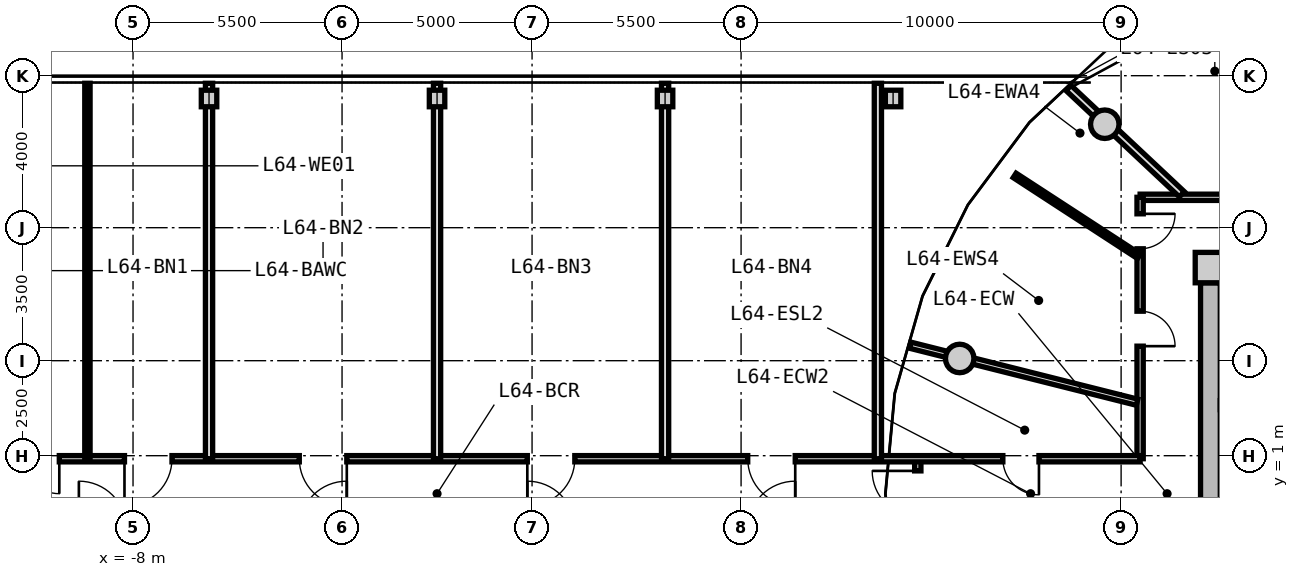
"""IFC4 building model, lengths in metres.
Left out: names, types, materials, properties, quantities, classifications, styles, units other than length and angle.
Written with IfcOpenShell. Run it as: python <this file> out.ifc"""

import sys

from ifc_helpers import new_model, si_unit, direction, frame, frame_2d, origin, origin_2d, place, context, subcontext, project, spatial, rectangle, circle, i_section, extrude, source, transform, mapped, element, fill, save


model = new_model("IFC4")
c1 = context("Model", 3, precision=1e-05, world=origin(), true_north=direction((0.0, 1.0)))
c2 = subcontext(c1, "Body", "Model", "MODEL_VIEW")
j1 = project(units=[si_unit("LENGTHUNIT", "METRE"), si_unit("PLANEANGLEUNIT", "RADIAN")], contexts=[c1])
p1 = place(None, origin())
s1 = spatial("IfcSite", under=j1, at=p1, CompositionType="ELEMENT")
p2 = place(p1, origin())
s2 = spatial("IfcBuilding", under=s1, at=p2, CompositionType="ELEMENT")
p3 = place(p2, frame((0.0, 0.0, 207.8)))
s3 = spatial("IfcBuildingStorey", under=s2, at=p3, CompositionType="ELEMENT", Elevation=207.8)
m1 = source(origin(), c2, "Body", "SweptSolid", [
    extrude(rectangle(XDim=0.8, YDim=0.8, at=origin_2d()), origin(), (0.0, 0.0, 1.0), 3.05),
])
p4 = place(p3, frame((20.35, 5.95, 0.0), z_axis=(0.0, 0.0, 1.0), x_axis=(1.0, 0.0, 0.0)))
e1 = element("IfcColumn", 1, at=p4, inside=s3, PredefinedType="COLUMN", context=c2, shape_type="MappedRepresentation", body=[
    mapped(m1, transform((0.0, 0.0, 0.0), x_axis=(1.0, 0.0, 0.0), y_axis=(0.0, 1.0, 0.0), z_axis=(0.0, 0.0, 1.0), scale=1.0)),
])
m2 = source(origin(), c2, "Body", "SweptSolid", [
    extrude(rectangle(XDim=11.1, YDim=0.52, at=frame_2d((5.55, 0.0))), origin(), (0.0, 0.0, 1.0), 2.76),
])
p5 = place(p3, frame((20.35, -5.55, 0.0), z_axis=(0.0, 0.0, 1.0), x_axis=(0.0, 1.0, 0.0)))
e2 = element("IfcWall", 2, at=p5, inside=s3, PredefinedType="SHEAR", context=c2, shape_type="MappedRepresentation", body=[
    mapped(m2, transform((0.0, 0.0, 0.0), x_axis=(1.0, 0.0, 0.0), y_axis=(0.0, 1.0, 0.0), z_axis=(0.0, 0.0, 1.0), scale=1.0)),
])
p6 = place(p5, frame((3.8, 0.0, 0.0)))
e3 = element("IfcOpeningElement", 3, at=p6, cuts=e2, PredefinedType="OPENING", context=c2, shape_type="SweptSolid", body=[
    extrude(rectangle(XDim=1.2, YDim=2.15, at=frame_2d((0.6, 1.075))), frame((0.0, 0.27, 0.0), z_axis=(0.0, -1.0, 0.0), x_axis=(1.0, 0.0, 0.0)), (0.0, 0.0, 1.0), 0.54),
])
m3 = source(origin(), c2, "Body", "SweptSolid", [
    extrude(circle(Radius=0.375, at=origin_2d()), origin(), (0.0, 0.0, 1.0), 3.05),
])
for number, where, z_axis, x_axis in (
    (4, (17.57, 9.723, 0.0), (0.0, 0.0, 1.0), (1.0, 0.0, 0.0)),
    (5, (13.753, 3.559, 0.0), (0.0, 0.0, 1.0), (1.0, 0.0, 0.0)),
):
    element("IfcColumn", number, at=place(p3, frame(where, z_axis=z_axis, x_axis=x_axis)), inside=s3, PredefinedType="COLUMN", context=c2, shape_type="MappedRepresentation", body=[
        mapped(m3, transform((0.0, 0.0, 0.0), x_axis=(1.0, 0.0, 0.0), y_axis=(0.0, 1.0, 0.0), z_axis=(0.0, 0.0, 1.0), scale=1.0)),
    ])
m4 = source(origin(), c2, "Body", "SweptSolid", [
    extrude(i_section(OverallWidth=0.407, OverallDepth=0.435, WebThickness=0.024, FlangeThickness=0.039, FilletRadius=0.015, at=origin_2d()), origin(), (0.0, 0.0, 1.0), 3.05),
])
for number, where, z_axis, x_axis in (
    (6, (-6.0, 10.4, 0.0), (0.0, 0.0, 1.0), (1.0, 0.0, 0.0)),
    (7, (0.0, 10.4, 0.0), (0.0, 0.0, 1.0), (1.0, 0.0, 0.0)),
    (8, (6.0, 10.4, 0.0), (0.0, 0.0, 1.0), (1.0, 0.0, 0.0)),
    (9, (12.0, 10.4, 0.0), (0.0, 0.0, 1.0), (1.0, 0.0, 0.0)),
):
    element("IfcColumn", number, at=place(p3, frame(where, z_axis=z_axis, x_axis=x_axis)), inside=s3, PredefinedType="COLUMN", context=c2, shape_type="MappedRepresentation", body=[
        mapped(m4, transform((0.0, 0.0, 0.0), x_axis=(1.0, 0.0, 0.0), y_axis=(0.0, 1.0, 0.0), z_axis=(0.0, 0.0, 1.0), scale=1.0)),
    ])
m5 = source(origin(), c2, "Body", "SweptSolid", [
    extrude(rectangle(XDim=8.58, YDim=0.165, at=frame_2d((4.29, 0.0))), origin(), (0.0, 0.0, 1.0), 2.745),
])
p7 = place(p3, frame((18.5, 7.8, 0.0), z_axis=(0.0, 0.0, 1.0), x_axis=(1.0, 0.0, 0.0)))
e10 = element("IfcWall", 10, at=p7, inside=s3, PredefinedType="PARTITIONING", context=c2, shape_type="MappedRepresentation", body=[
    mapped(m5, transform((0.0, 0.0, 0.0), x_axis=(1.0, 0.0, 0.0), y_axis=(0.0, 1.0, 0.0), z_axis=(0.0, 0.0, 1.0), scale=1.0)),
])
p8 = place(p7, frame((2.515, 0.0, 0.0)))
e11 = element("IfcOpeningElement", 11, at=p8, cuts=e10, PredefinedType="OPENING", context=c2, shape_type="SweptSolid", body=[
    extrude(rectangle(XDim=1.05, YDim=2.15, at=frame_2d((0.525, 1.075))), frame((0.0, 0.093, 0.0), z_axis=(0.0, -1.0, 0.0), x_axis=(1.0, 0.0, 0.0)), (0.0, 0.0, 1.0), 0.185),
])
m6 = source(origin(), c2, "Body", "SweptSolid", [
    extrude(rectangle(XDim=6.88, YDim=0.165, at=frame_2d((3.44, 0.0))), origin(), (0.0, 0.0, 1.0), 2.745),
])
p9 = place(p3, frame((18.5, 0.92, 0.0), z_axis=(0.0, 0.0, 1.0), x_axis=(0.0, 1.0, 0.0)))
e12 = element("IfcWall", 12, at=p9, inside=s3, PredefinedType="PARTITIONING", context=c2, shape_type="MappedRepresentation", body=[
    mapped(m6, transform((0.0, 0.0, 0.0), x_axis=(1.0, 0.0, 0.0), y_axis=(0.0, 1.0, 0.0), z_axis=(0.0, 0.0, 1.0), scale=1.0)),
])
p10 = place(p9, frame((5.525, 0.0, 0.0)))
e13 = element("IfcOpeningElement", 13, at=p10, cuts=e12, PredefinedType="OPENING", context=c2, shape_type="SweptSolid", body=[
    extrude(rectangle(XDim=0.92, YDim=2.1, at=frame_2d((0.46, 1.05))), frame((0.0, 0.093, 0.0), z_axis=(0.0, -1.0, 0.0), x_axis=(1.0, 0.0, 0.0)), (0.0, 0.0, 1.0), 0.185),
])
p11 = place(p9, frame((2.962, 0.0, 0.0)))
e14 = element("IfcOpeningElement", 14, at=p11, cuts=e12, PredefinedType="OPENING", context=c2, shape_type="SweptSolid", body=[
    extrude(rectangle(XDim=0.92, YDim=2.1, at=frame_2d((0.46, 1.05))), frame((0.0, 0.093, 0.0), z_axis=(0.0, -1.0, 0.0), x_axis=(1.0, 0.0, 0.0)), (0.0, 0.0, 1.0), 0.185),
])
m7 = source(origin(), c2, "Body", "SweptSolid", [
    extrude(rectangle(XDim=6.157, YDim=0.165, at=frame_2d((3.079, 0.0))), origin(), (0.0, 0.0, 1.0), 2.345),
])
p12 = place(p3, frame((18.42, 2.407, 0.0), z_axis=(0.0, 0.0, 1.0), x_axis=(-0.969840867184, 0.243738984038, 0.0)))
e15 = element("IfcWall", 15, at=p12, inside=s3, PredefinedType="PARTITIONING", context=c2, shape_type="MappedRepresentation", body=[
    mapped(m7, transform((0.0, 0.0, 0.0), x_axis=(1.0, 0.0, 0.0), y_axis=(0.0, 1.0, 0.0), z_axis=(0.0, 0.0, 1.0), scale=1.0)),
])
m8 = source(origin(), c2, "Body", "SweptSolid", [
    extrude(rectangle(XDim=4.089, YDim=0.19, at=frame_2d((2.044, 0.0))), origin(), (0.0, 0.0, 1.0), 2.345),
])
p13 = place(p3, frame((19.598, 7.88, 0.0), z_axis=(0.0, 0.0, 1.0), x_axis=(-0.729401273609, 0.684086092577, 0.0)))
e16 = element("IfcWall", 16, at=p13, inside=s3, PredefinedType="PARTITIONING", context=c2, shape_type="MappedRepresentation", body=[
    mapped(m8, transform((0.0, 0.0, 0.0), x_axis=(1.0, 0.0, 0.0), y_axis=(0.0, 1.0, 0.0), z_axis=(0.0, 0.0, 1.0), scale=1.0)),
])
m9 = source(origin(), c2, "Body", "SweptSolid", [
    extrude(rectangle(XDim=3.904, YDim=0.14, at=frame_2d((1.952, 0.0))), origin(), (0.0, 0.0, 1.0), 2.745),
])
p14 = place(p3, frame((18.47, 6.246, 0.0), z_axis=(0.0, 0.0, 1.0), x_axis=(-0.838024687996, 0.545632314209, 0.0)))
e17 = element("IfcWall", 17, at=p14, inside=s3, PredefinedType="PARTITIONING", context=c2, shape_type="MappedRepresentation", body=[
    mapped(m9, transform((0.0, 0.0, 0.0), x_axis=(1.0, 0.0, 0.0), y_axis=(0.0, 1.0, 0.0), z_axis=(0.0, 0.0, 1.0), scale=1.0)),
])
m10 = source(origin(), c2, "Body", "SweptSolid", [
    extrude(rectangle(XDim=1.84, YDim=0.165, at=frame_2d((0.92, 0.0))), origin(), (0.0, 0.0, 1.0), 2.745),
])
p15 = place(p3, frame((12.65, -0.92, 0.0), z_axis=(0.0, 0.0, 1.0), x_axis=(0.0, 1.0, 0.0)))
e18 = element("IfcWall", 18, at=p15, inside=s3, PredefinedType="PARTITIONING", context=c2, shape_type="MappedRepresentation", body=[
    mapped(m10, transform((0.0, 0.0, 0.0), x_axis=(1.0, 0.0, 0.0), y_axis=(0.0, 1.0, 0.0), z_axis=(0.0, 0.0, 1.0), scale=1.0)),
])
p16 = place(p15, frame((0.32, 0.0, 0.0)))
e19 = element("IfcOpeningElement", 19, at=p16, cuts=e18, PredefinedType="OPENING", context=c2, shape_type="SweptSolid", body=[
    extrude(rectangle(XDim=1.2, YDim=2.15, at=frame_2d((0.6, 1.075))), frame((0.0, 0.093, 0.0), z_axis=(0.0, -1.0, 0.0), x_axis=(1.0, 0.0, 0.0)), (0.0, 0.0, 1.0), 0.185),
])
m11 = source(origin(), c2, "Body", "SweptSolid", [
    extrude(rectangle(XDim=37.0, YDim=0.165, at=frame_2d((18.5, 0.0))), origin(), (0.0, 0.0, 1.0), 2.745),
])
p17 = place(p3, frame((-18.5, 0.92, 0.0), z_axis=(0.0, 0.0, 1.0), x_axis=(1.0, 0.0, 0.0)))
e20 = element("IfcWall", 20, at=p17, inside=s3, PredefinedType="PARTITIONING", context=c2, shape_type="MappedRepresentation", body=[
    mapped(m11, transform((0.0, 0.0, 0.0), x_axis=(1.0, 0.0, 0.0), y_axis=(0.0, 1.0, 0.0), z_axis=(0.0, 0.0, 1.0), scale=1.0)),
])
p18 = place(p17, frame((2.662, 0.0, 0.0)))
e21 = element("IfcOpeningElement", 21, at=p18, cuts=e20, PredefinedType="OPENING", context=c2, shape_type="SweptSolid", body=[
    extrude(rectangle(XDim=0.95, YDim=2.1, at=frame_2d((0.475, 1.05))), frame((0.0, 0.093, 0.0), z_axis=(0.0, -1.0, 0.0), x_axis=(1.0, 0.0, 0.0)), (0.0, 0.0, 1.0), 0.185),
])
p19 = place(p17, frame((33.388, 0.0, 0.0)))
e22 = element("IfcOpeningElement", 22, at=p19, cuts=e20, PredefinedType="OPENING", context=c2, shape_type="SweptSolid", body=[
    extrude(rectangle(XDim=0.95, YDim=2.1, at=frame_2d((0.475, 1.05))), frame((0.0, 0.093, 0.0), z_axis=(0.0, -1.0, 0.0), x_axis=(1.0, 0.0, 0.0)), (0.0, 0.0, 1.0), 0.185),
])
p20 = place(p17, frame((7.64, 0.0, 0.0)))
e23 = element("IfcOpeningElement", 23, at=p20, cuts=e20, PredefinedType="OPENING", context=c2, shape_type="SweptSolid", body=[
    extrude(rectangle(XDim=0.92, YDim=2.1, at=frame_2d((0.46, 1.05))), frame((0.0, 0.093, 0.0), z_axis=(0.0, -1.0, 0.0), x_axis=(1.0, 0.0, 0.0)), (0.0, 0.0, 1.0), 0.185),
])
p21 = place(p17, frame((10.275, 0.0, 0.0)))
e24 = element("IfcOpeningElement", 24, at=p21, cuts=e20, PredefinedType="OPENING", context=c2, shape_type="SweptSolid", body=[
    extrude(rectangle(XDim=1.25, YDim=2.2, at=frame_2d((0.625, 1.1))), frame((0.0, 0.093, 0.0), z_axis=(0.0, -1.0, 0.0), x_axis=(1.0, 0.0, 0.0)), (0.0, 0.0, 1.0), 0.185),
])
p22 = place(p17, frame((14.875, 0.0, 0.0)))
e25 = element("IfcOpeningElement", 25, at=p22, cuts=e20, PredefinedType="OPENING", context=c2, shape_type="SweptSolid", body=[
    extrude(rectangle(XDim=1.25, YDim=2.2, at=frame_2d((0.625, 1.1))), frame((0.0, 0.093, 0.0), z_axis=(0.0, -1.0, 0.0), x_axis=(1.0, 0.0, 0.0)), (0.0, 0.0, 1.0), 0.185),
])
p23 = place(p17, frame((20.875, 0.0, 0.0)))
e26 = element("IfcOpeningElement", 26, at=p23, cuts=e20, PredefinedType="OPENING", context=c2, shape_type="SweptSolid", body=[
    extrude(rectangle(XDim=1.25, YDim=2.2, at=frame_2d((0.625, 1.1))), frame((0.0, 0.093, 0.0), z_axis=(0.0, -1.0, 0.0), x_axis=(1.0, 0.0, 0.0)), (0.0, 0.0, 1.0), 0.185),
])
p24 = place(p17, frame((26.675, 0.0, 0.0)))
e27 = element("IfcOpeningElement", 27, at=p24, cuts=e20, PredefinedType="OPENING", context=c2, shape_type="SweptSolid", body=[
    extrude(rectangle(XDim=1.25, YDim=2.2, at=frame_2d((0.625, 1.1))), frame((0.0, 0.093, 0.0), z_axis=(0.0, -1.0, 0.0), x_axis=(1.0, 0.0, 0.0)), (0.0, 0.0, 1.0), 0.185),
])
m12 = source(origin(), c2, "Body", "SweptSolid", [
    extrude(rectangle(XDim=9.88, YDim=0.19, at=frame_2d((4.94, 0.0))), origin(), (0.0, 0.0, 1.0), 2.745),
])
p25 = place(p3, frame((11.6, 0.92, 0.0), z_axis=(0.0, 0.0, 1.0), x_axis=(0.0, 1.0, 0.0)))
e28 = element("IfcWall", 28, at=p25, inside=s3, PredefinedType="PARTITIONING", context=c2, shape_type="MappedRepresentation", body=[
    mapped(m12, transform((0.0, 0.0, 0.0), x_axis=(1.0, 0.0, 0.0), y_axis=(0.0, 1.0, 0.0), z_axis=(0.0, 0.0, 1.0), scale=1.0)),
])
m13 = source(origin(), c2, "Body", "SweptSolid", [
    extrude(rectangle(XDim=9.88, YDim=0.19, at=frame_2d((4.94, 0.0))), origin(), (0.0, 0.0, 1.0), 2.045),
])
p26 = place(p3, frame((-6.0, 0.92, 0.0), z_axis=(0.0, 0.0, 1.0), x_axis=(0.0, 1.0, 0.0)))
e29 = element("IfcWall", 29, at=p26, inside=s3, PredefinedType="PARTITIONING", context=c2, shape_type="MappedRepresentation", body=[
    mapped(m13, transform((0.0, 0.0, 0.0), x_axis=(1.0, 0.0, 0.0), y_axis=(0.0, 1.0, 0.0), z_axis=(0.0, 0.0, 1.0), scale=1.0)),
])
m14 = source(origin(), c2, "Body", "SweptSolid", [
    extrude(rectangle(XDim=9.88, YDim=0.14, at=frame_2d((4.94, 0.0))), origin(), (0.0, 0.0, 1.0), 2.745),
])
p27 = place(p3, frame((-9.2, 0.92, 0.0), z_axis=(0.0, 0.0, 1.0), x_axis=(0.0, 1.0, 0.0)))
e30 = element("IfcWall", 30, at=p27, inside=s3, PredefinedType="PARTITIONING", context=c2, shape_type="MappedRepresentation", body=[
    mapped(m14, transform((0.0, 0.0, 0.0), x_axis=(1.0, 0.0, 0.0), y_axis=(0.0, 1.0, 0.0), z_axis=(0.0, 0.0, 1.0), scale=1.0)),
])
for number, where, z_axis, x_axis in (
    (31, (0.0, 0.92, 0.0), (0.0, 0.0, 1.0), (0.0, 1.0, 0.0)),
    (32, (6.0, 0.92, 0.0), (0.0, 0.0, 1.0), (0.0, 1.0, 0.0)),
):
    element("IfcWall", number, at=place(p3, frame(where, z_axis=z_axis, x_axis=x_axis)), inside=s3, PredefinedType="PARTITIONING", context=c2, shape_type="MappedRepresentation", body=[
        mapped(m13, transform((0.0, 0.0, 0.0), x_axis=(1.0, 0.0, 0.0), y_axis=(0.0, 1.0, 0.0), z_axis=(0.0, 0.0, 1.0), scale=1.0)),
    ])
m15 = source(origin(), c2, "Body", "SweptSolid", [
    extrude(rectangle(XDim=0.95, YDim=2.1, at=frame_2d((0.475, 1.05))), frame((0.0, 0.025, 0.0), z_axis=(0.0, -1.0, 0.0), x_axis=(1.0, 0.0, 0.0)), (0.0, 0.0, 1.0), 0.05),
])
p28 = place(p19, frame((0.95, 0.0, 0.0), z_axis=(0.0, 0.0, 1.0), x_axis=(-1.0, 0.0, 0.0)))
e33 = element("IfcDoor", 33, at=p28, inside=s3, OperationType="SINGLE_SWING_LEFT", PredefinedType="DOOR", context=c2, shape_type="MappedRepresentation", body=[
    mapped(m15, transform((0.0, 0.0, 0.0), x_axis=(1.0, 0.0, 0.0), y_axis=(0.0, 1.0, 0.0), z_axis=(0.0, 0.0, 1.0), scale=1.0)),
])
fill(e22, e33)
m16 = source(origin(), c2, "Body", "SweptSolid", [
    extrude(rectangle(XDim=0.92, YDim=2.1, at=frame_2d((0.46, 1.05))), frame((0.0, 0.025, 0.0), z_axis=(0.0, -1.0, 0.0), x_axis=(1.0, 0.0, 0.0)), (0.0, 0.0, 1.0), 0.05),
])
p29 = place(p10, frame((0.92, 0.0, 0.0), z_axis=(0.0, 0.0, 1.0), x_axis=(-1.0, 0.0, 0.0)))
e34 = element("IfcDoor", 34, at=p29, inside=s3, OperationType="SINGLE_SWING_LEFT", PredefinedType="DOOR", context=c2, shape_type="MappedRepresentation", body=[
    mapped(m16, transform((0.0, 0.0, 0.0), x_axis=(1.0, 0.0, 0.0), y_axis=(0.0, 1.0, 0.0), z_axis=(0.0, 0.0, 1.0), scale=1.0)),
])
fill(e13, e34)
p30 = place(p11, frame((0.92, 0.0, 0.0), z_axis=(0.0, 0.0, 1.0), x_axis=(-1.0, 0.0, 0.0)))
e35 = element("IfcDoor", 35, at=p30, inside=s3, OperationType="SINGLE_SWING_RIGHT", PredefinedType="DOOR", context=c2, shape_type="MappedRepresentation", body=[
    mapped(m16, transform((0.0, 0.0, 0.0), x_axis=(1.0, 0.0, 0.0), y_axis=(0.0, 1.0, 0.0), z_axis=(0.0, 0.0, 1.0), scale=1.0)),
])
fill(e14, e35)
m17 = source(origin(), c2, "Body", "SweptSolid", [
    extrude(rectangle(XDim=1.2, YDim=2.15, at=frame_2d((0.6, 1.075))), frame((0.0, 0.025, 0.0), z_axis=(0.0, -1.0, 0.0), x_axis=(1.0, 0.0, 0.0)), (0.0, 0.0, 1.0), 0.05),
])
p31 = place(p16, origin())
e36 = element("IfcDoor", 36, at=p31, inside=s3, OperationType="SINGLE_SWING_RIGHT", PredefinedType="DOOR", context=c2, shape_type="MappedRepresentation", body=[
    mapped(m17, transform((0.0, 0.0, 0.0), x_axis=(1.0, 0.0, 0.0), y_axis=(0.0, 1.0, 0.0), z_axis=(0.0, 0.0, 1.0), scale=1.0)),
])
fill(e19, e36)
p32 = place(p20, frame((0.92, 0.0, 0.0), z_axis=(0.0, 0.0, 1.0), x_axis=(-1.0, 0.0, 0.0)))
e37 = element("IfcDoor", 37, at=p32, inside=s3, OperationType="SINGLE_SWING_LEFT", PredefinedType="DOOR", context=c2, shape_type="MappedRepresentation", body=[
    mapped(m16, transform((0.0, 0.0, 0.0), x_axis=(1.0, 0.0, 0.0), y_axis=(0.0, 1.0, 0.0), z_axis=(0.0, 0.0, 1.0), scale=1.0)),
])
fill(e23, e37)
m18 = source(origin(), c2, "Body", "SweptSolid", [
    extrude(rectangle(XDim=1.25, YDim=2.2, at=frame_2d((0.625, 1.1))), frame((0.0, 0.025, 0.0), z_axis=(0.0, -1.0, 0.0), x_axis=(1.0, 0.0, 0.0)), (0.0, 0.0, 1.0), 0.05),
])
p33 = place(p21, frame((1.25, 0.0, 0.0), z_axis=(0.0, 0.0, 1.0), x_axis=(-1.0, 0.0, 0.0)))
e38 = element("IfcDoor", 38, at=p33, inside=s3, OperationType="SINGLE_SWING_RIGHT", PredefinedType="DOOR", context=c2, shape_type="MappedRepresentation", body=[
    mapped(m18, transform((0.0, 0.0, 0.0), x_axis=(1.0, 0.0, 0.0), y_axis=(0.0, 1.0, 0.0), z_axis=(0.0, 0.0, 1.0), scale=1.0)),
])
fill(e24, e38)
p34 = place(p22, frame((1.25, 0.0, 0.0), z_axis=(0.0, 0.0, 1.0), x_axis=(-1.0, 0.0, 0.0)))
e39 = element("IfcDoor", 39, at=p34, inside=s3, OperationType="SINGLE_SWING_LEFT", PredefinedType="DOOR", context=c2, shape_type="MappedRepresentation", body=[
    mapped(m18, transform((0.0, 0.0, 0.0), x_axis=(1.0, 0.0, 0.0), y_axis=(0.0, 1.0, 0.0), z_axis=(0.0, 0.0, 1.0), scale=1.0)),
])
fill(e25, e39)
p35 = place(p23, frame((1.25, 0.0, 0.0), z_axis=(0.0, 0.0, 1.0), x_axis=(-1.0, 0.0, 0.0)))
e40 = element("IfcDoor", 40, at=p35, inside=s3, OperationType="SINGLE_SWING_RIGHT", PredefinedType="DOOR", context=c2, shape_type="MappedRepresentation", body=[
    mapped(m18, transform((0.0, 0.0, 0.0), x_axis=(1.0, 0.0, 0.0), y_axis=(0.0, 1.0, 0.0), z_axis=(0.0, 0.0, 1.0), scale=1.0)),
])
fill(e26, e40)
p36 = place(p24, frame((1.25, 0.0, 0.0), z_axis=(0.0, 0.0, 1.0), x_axis=(-1.0, 0.0, 0.0)))
e41 = element("IfcDoor", 41, at=p36, inside=s3, OperationType="SINGLE_SWING_LEFT", PredefinedType="DOOR", context=c2, shape_type="MappedRepresentation", body=[
    mapped(m18, transform((0.0, 0.0, 0.0), x_axis=(1.0, 0.0, 0.0), y_axis=(0.0, 1.0, 0.0), z_axis=(0.0, 0.0, 1.0), scale=1.0)),
])
fill(e27, e41)
save(model, sys.argv[1])
